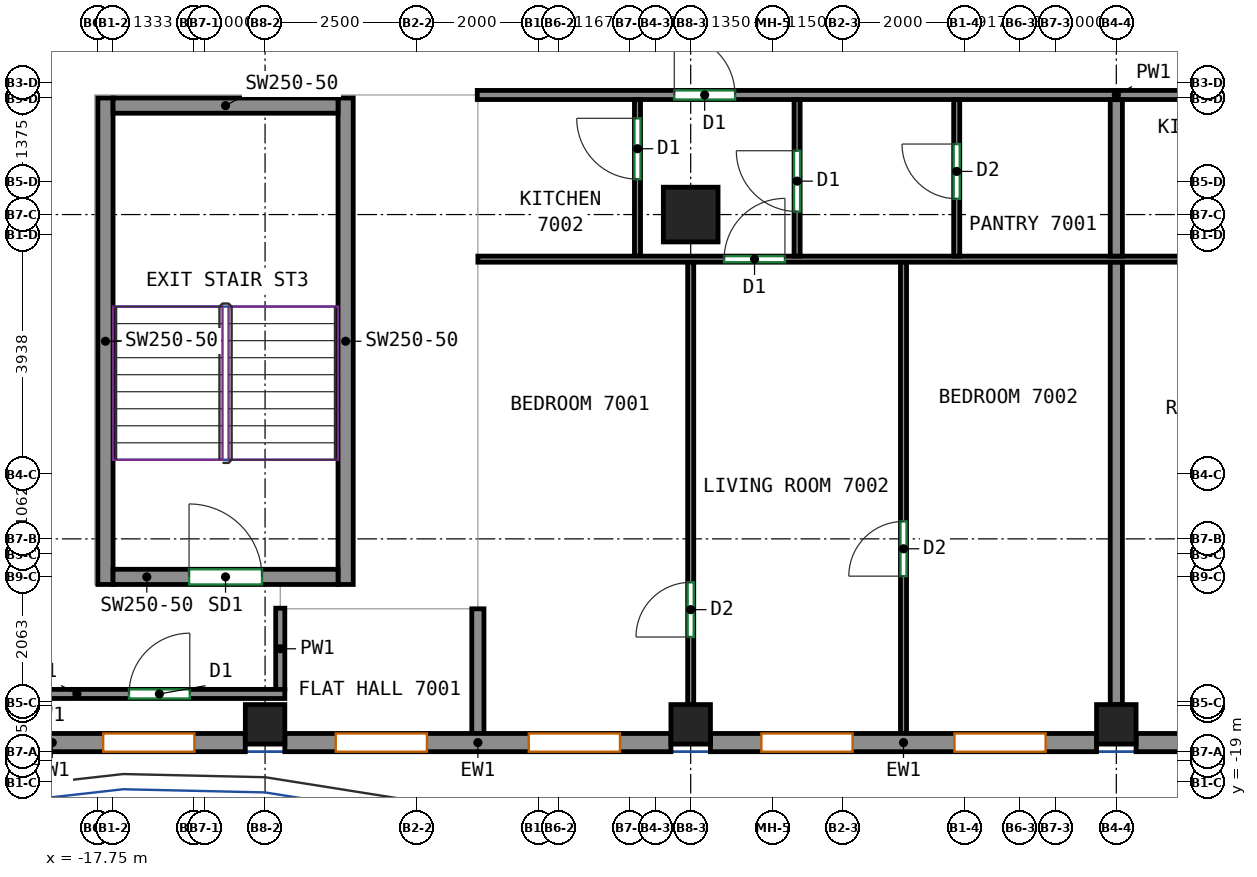
"""IFC4 building model, lengths in metres.
Left out: names, types, materials, properties, quantities, classifications, styles, units other than length and angle.
Written with IfcOpenShell. Run it as: python <this file> out.ifc"""

import sys

from ifc_helpers import new_model, si_unit, direction, frame, frame_2d, origin, origin_2d, place, context, subcontext, project, spatial, rectangle, extrude, source, transform, mapped, element, fill, save


model = new_model("IFC4")
c1 = context("Model", 3, precision=1e-05, world=origin(), true_north=direction((0.0, 1.0)))
c2 = subcontext(c1, "Body", "Model", "MODEL_VIEW")
j1 = project(units=[si_unit("LENGTHUNIT", "METRE"), si_unit("PLANEANGLEUNIT", "RADIAN")], contexts=[c1])
p1 = place(None, origin())
s1 = spatial("IfcSite", under=j1, at=p1, CompositionType="ELEMENT")
p2 = place(p1, origin())
s2 = spatial("IfcBuilding", under=s1, at=p2, CompositionType="ELEMENT")
p3 = place(p2, frame((0.0, 0.0, 284.0)))
s3 = spatial("IfcBuildingStorey", under=s2, at=p3, CompositionType="ELEMENT", Elevation=284.0)
m1 = source(origin(), c2, "Body", "SweptSolid", [
    extrude(rectangle(XDim=0.65, YDim=0.65, at=origin_2d()), origin(), (0.0, 0.0, 1.0), 3.12),
])
for number, where, z_axis, x_axis in (
    (1, (-15.0, -18.05, 0.0), (0.0, 0.0, 1.0), (1.0, 0.0, 0.0)),
    (2, (-8.0, -18.05, 0.0), (0.0, 0.0, 1.0), (1.0, 0.0, 0.0)),
):
    element("IfcColumn", number, at=place(p3, frame(where, z_axis=z_axis, x_axis=x_axis)), inside=s3, PredefinedType="COLUMN", context=c2, shape_type="MappedRepresentation", body=[
        mapped(m1, transform((0.0, 0.0, 0.0))),
    ])
m2 = source(origin(), c2, "Body", "SweptSolid", [
    extrude(rectangle(XDim=0.9, YDim=0.9, at=origin_2d()), origin(), (0.0, 0.0, 1.0), 3.12),
])
p4 = place(p3, frame((-8.0, -9.667, 0.0), z_axis=(0.0, 0.0, 1.0), x_axis=(1.0, 0.0, 0.0)))
e3 = element("IfcColumn", 3, at=p4, inside=s3, PredefinedType="COLUMN", context=c2, shape_type="MappedRepresentation", body=[
    mapped(m2, transform((0.0, 0.0, 0.0))),
])
p5 = place(p3, frame((-1.0, -18.05, 0.0), z_axis=(0.0, 0.0, 1.0), x_axis=(1.0, 0.0, 0.0)))
e4 = element("IfcColumn", 4, at=p5, inside=s3, PredefinedType="COLUMN", context=c2, shape_type="MappedRepresentation", body=[
    mapped(m1, transform((0.0, 0.0, 0.0))),
])
m3 = source(origin(), c2, "Body", "SweptSolid", [
    extrude(rectangle(XDim=8.0, YDim=0.25, at=frame_2d((4.0, 0.0))), origin(), (0.0, 0.0, 1.0), 3.12),
])
for number, where, z_axis, x_axis in (
    (5, (-17.625, -15.75, 0.0), (0.0, 0.0, 1.0), (0.0, 1.0, 0.0)),
    (6, (-13.675, -15.75, 0.0), (0.0, 0.0, 1.0), (0.0, 1.0, 0.0)),
):
    element("IfcWall", number, at=place(p3, frame(where, z_axis=z_axis, x_axis=x_axis)), inside=s3, PredefinedType="SHEAR", context=c2, shape_type="MappedRepresentation", body=[
        mapped(m3, transform((0.0, 0.0, 0.0))),
    ])
m4 = source(origin(), c2, "Body", "SweptSolid", [
    extrude(rectangle(XDim=3.7, YDim=0.25, at=frame_2d((1.85, 0.0))), origin(), (0.0, 0.0, 1.0), 3.12),
])
p6 = place(p3, frame((-17.5, -15.625, 0.0), z_axis=(0.0, 0.0, 1.0), x_axis=(1.0, 0.0, 0.0)))
e7 = element("IfcWall", 7, at=p6, inside=s3, PredefinedType="SHEAR", context=c2, shape_type="MappedRepresentation", body=[
    mapped(m4, transform((0.0, 0.0, 0.0))),
])
p7 = place(p6, frame((1.25, 0.0, 0.0)))
e8 = element("IfcOpeningElement", 8, at=p7, cuts=e7, PredefinedType="OPENING", context=c2, shape_type="SweptSolid", body=[
    extrude(rectangle(XDim=1.2, YDim=2.1, at=frame_2d((0.6, 1.05))), frame((0.0, 0.135, 0.0), z_axis=(0.0, -1.0, 0.0), x_axis=(1.0, 0.0, 0.0)), (0.0, 0.0, 1.0), 0.27),
])
p8 = place(p3, frame((-17.5, -7.875, 0.0), z_axis=(0.0, 0.0, 1.0), x_axis=(1.0, 0.0, 0.0)))
e9 = element("IfcWall", 9, at=p8, inside=s3, PredefinedType="SHEAR", context=c2, shape_type="MappedRepresentation", body=[
    mapped(m4, transform((0.0, 0.0, 0.0))),
])
m5 = source(origin(), c2, "Body", "SweptSolid", [
    extrude(rectangle(XDim=6.35, YDim=0.3, at=frame_2d((3.175, 0.0))), origin(), (0.0, 0.0, 1.0), 3.12),
])
p9 = place(p3, frame((-21.675, -18.35, 0.0), z_axis=(0.0, 0.0, 1.0), x_axis=(1.0, 0.0, 0.0)))
e10 = element("IfcWall", 10, at=p9, inside=s3, PredefinedType="SOLIDWALL", context=c2, shape_type="MappedRepresentation", body=[
    mapped(m5, transform((0.0, 0.0, 0.0))),
])
p10 = place(p9, frame((0.837, 0.0, 0.8)))
e11 = element("IfcOpeningElement", 11, at=p10, cuts=e10, PredefinedType="OPENING", context=c2, shape_type="SweptSolid", body=[
    extrude(rectangle(XDim=1.5, YDim=2.05, at=frame_2d((0.75, 1.025))), frame((0.0, 0.16, 0.0), z_axis=(0.0, -1.0, 0.0), x_axis=(1.0, 0.0, 0.0)), (0.0, 0.0, 1.0), 0.32),
])
p11 = place(p9, frame((4.012, 0.0, 0.8)))
e12 = element("IfcOpeningElement", 12, at=p11, cuts=e10, PredefinedType="OPENING", context=c2, shape_type="SweptSolid", body=[
    extrude(rectangle(XDim=1.5, YDim=2.05, at=frame_2d((0.75, 1.025))), frame((0.0, 0.16, 0.0), z_axis=(0.0, -1.0, 0.0), x_axis=(1.0, 0.0, 0.0)), (0.0, 0.0, 1.0), 0.32),
])
p12 = place(p3, frame((-14.675, -18.35, 0.0), z_axis=(0.0, 0.0, 1.0), x_axis=(1.0, 0.0, 0.0)))
e13 = element("IfcWall", 13, at=p12, inside=s3, PredefinedType="SOLIDWALL", context=c2, shape_type="MappedRepresentation", body=[
    mapped(m5, transform((0.0, 0.0, 0.0))),
])
p13 = place(p12, frame((0.837, 0.0, 0.8)))
e14 = element("IfcOpeningElement", 14, at=p13, cuts=e13, PredefinedType="OPENING", context=c2, shape_type="SweptSolid", body=[
    extrude(rectangle(XDim=1.5, YDim=2.05, at=frame_2d((0.75, 1.025))), frame((0.0, 0.16, 0.0), z_axis=(0.0, -1.0, 0.0), x_axis=(1.0, 0.0, 0.0)), (0.0, 0.0, 1.0), 0.32),
])
p14 = place(p12, frame((4.012, 0.0, 0.8)))
e15 = element("IfcOpeningElement", 15, at=p14, cuts=e13, PredefinedType="OPENING", context=c2, shape_type="SweptSolid", body=[
    extrude(rectangle(XDim=1.5, YDim=2.05, at=frame_2d((0.75, 1.025))), frame((0.0, 0.16, 0.0), z_axis=(0.0, -1.0, 0.0), x_axis=(1.0, 0.0, 0.0)), (0.0, 0.0, 1.0), 0.32),
])
p15 = place(p3, frame((-7.675, -18.35, 0.0), z_axis=(0.0, 0.0, 1.0), x_axis=(1.0, 0.0, 0.0)))
e16 = element("IfcWall", 16, at=p15, inside=s3, PredefinedType="SOLIDWALL", context=c2, shape_type="MappedRepresentation", body=[
    mapped(m5, transform((0.0, 0.0, 0.0))),
])
p16 = place(p15, frame((0.837, 0.0, 0.8)))
e17 = element("IfcOpeningElement", 17, at=p16, cuts=e16, PredefinedType="OPENING", context=c2, shape_type="SweptSolid", body=[
    extrude(rectangle(XDim=1.5, YDim=2.05, at=frame_2d((0.75, 1.025))), frame((0.0, 0.16, 0.0), z_axis=(0.0, -1.0, 0.0), x_axis=(1.0, 0.0, 0.0)), (0.0, 0.0, 1.0), 0.32),
])
p17 = place(p15, frame((4.012, 0.0, 0.8)))
e18 = element("IfcOpeningElement", 18, at=p17, cuts=e16, PredefinedType="OPENING", context=c2, shape_type="SweptSolid", body=[
    extrude(rectangle(XDim=1.5, YDim=2.05, at=frame_2d((0.75, 1.025))), frame((0.0, 0.16, 0.0), z_axis=(0.0, -1.0, 0.0), x_axis=(1.0, 0.0, 0.0)), (0.0, 0.0, 1.0), 0.32),
])
p18 = place(p3, frame((-0.675, -18.35, 0.0), z_axis=(0.0, 0.0, 1.0), x_axis=(1.0, 0.0, 0.0)))
e19 = element("IfcWall", 19, at=p18, inside=s3, PredefinedType="SOLIDWALL", context=c2, shape_type="MappedRepresentation", body=[
    mapped(m5, transform((0.0, 0.0, 0.0))),
])
p19 = place(p18, frame((0.837, 0.0, 0.8)))
e20 = element("IfcOpeningElement", 20, at=p19, cuts=e19, PredefinedType="OPENING", context=c2, shape_type="SweptSolid", body=[
    extrude(rectangle(XDim=1.5, YDim=2.05, at=frame_2d((0.75, 1.025))), frame((0.0, 0.16, 0.0), z_axis=(0.0, -1.0, 0.0), x_axis=(1.0, 0.0, 0.0)), (0.0, 0.0, 1.0), 0.32),
])
p20 = place(p18, frame((4.012, 0.0, 0.8)))
e21 = element("IfcOpeningElement", 21, at=p20, cuts=e19, PredefinedType="OPENING", context=c2, shape_type="SweptSolid", body=[
    extrude(rectangle(XDim=1.5, YDim=2.05, at=frame_2d((0.75, 1.025))), frame((0.0, 0.16, 0.0), z_axis=(0.0, -1.0, 0.0), x_axis=(1.0, 0.0, 0.0)), (0.0, 0.0, 1.0), 0.32),
])
p21 = place(p3, frame((-14.75, -17.475, 0.0), z_axis=(0.0, 0.0, 1.0), x_axis=(0.0, 1.0, 0.0)))
e22 = element("IfcWall", 22, at=p21, inside=s3, PredefinedType="PARTITIONING", context=c2, shape_type="SweptSolid", body=[
    extrude(rectangle(XDim=1.335, YDim=0.15, at=frame_2d((0.667, 0.0))), origin(), (0.0, 0.0, 1.0), 3.12),
])
p22 = place(p3, frame((-18.698, -17.55, 0.0), z_axis=(0.0, 0.0, 1.0), x_axis=(1.0, 0.0, 0.0)))
e23 = element("IfcWall", 23, at=p22, inside=s3, PredefinedType="PARTITIONING", context=c2, shape_type="SweptSolid", body=[
    extrude(rectangle(XDim=4.023, YDim=0.15, at=frame_2d((2.011, 0.0))), origin(), (0.0, 0.0, 1.0), 3.12),
])
p23 = place(p22, frame((1.46, 0.0, 0.0)))
e24 = element("IfcOpeningElement", 24, at=p23, cuts=e23, PredefinedType="OPENING", context=c2, shape_type="SweptSolid", body=[
    extrude(rectangle(XDim=1.0, YDim=2.1, at=frame_2d((0.5, 1.05))), frame((0.0, 0.085, 0.0), z_axis=(0.0, -1.0, 0.0), x_axis=(1.0, 0.0, 0.0)), (0.0, 0.0, 1.0), 0.17),
])
p24 = place(p3, frame((-11.51, -7.7, 0.0), z_axis=(0.0, 0.0, 1.0), x_axis=(1.0, 0.0, 0.0)))
e25 = element("IfcWall", 25, at=p24, inside=s3, PredefinedType="PARTITIONING", context=c2, shape_type="SweptSolid", body=[
    extrude(rectangle(XDim=21.02, YDim=0.15, at=frame_2d((10.51, 0.0))), origin(), (0.0, 0.0, 1.0), 3.12),
])
p25 = place(p24, frame((3.24, 0.0, 0.0)))
e26 = element("IfcOpeningElement", 26, at=p25, cuts=e25, PredefinedType="OPENING", context=c2, shape_type="SweptSolid", body=[
    extrude(rectangle(XDim=1.0, YDim=2.1, at=frame_2d((0.5, 1.05))), frame((0.0, 0.085, 0.0), z_axis=(0.0, -1.0, 0.0), x_axis=(1.0, 0.0, 0.0)), (0.0, 0.0, 1.0), 0.17),
])
p26 = place(p24, frame((14.321, 0.0, 0.0)))
e27 = element("IfcOpeningElement", 27, at=p26, cuts=e25, PredefinedType="OPENING", context=c2, shape_type="SweptSolid", body=[
    extrude(rectangle(XDim=1.0, YDim=2.1, at=frame_2d((0.5, 1.05))), frame((0.0, 0.085, 0.0), z_axis=(0.0, -1.0, 0.0), x_axis=(1.0, 0.0, 0.0)), (0.0, 0.0, 1.0), 0.17),
])
p27 = place(p3, frame((-11.5, -18.25, 0.0), z_axis=(0.0, 0.0, 1.0), x_axis=(0.0, 1.0, 0.0)))
e28 = element("IfcWall", 28, at=p27, inside=s3, PredefinedType="PARTITIONING", context=c2, shape_type="SweptSolid", body=[
    extrude(rectangle(XDim=2.1, YDim=0.2, at=frame_2d((1.05, 0.0))), origin(), (0.0, 0.0, 1.0), 3.12),
])
p28 = place(p3, frame((-8.875, -10.35, 0.0), z_axis=(0.0, 0.0, 1.0), x_axis=(0.0, 1.0, 0.0)))
e29 = element("IfcWall", 29, at=p28, inside=s3, PredefinedType="PARTITIONING", context=c2, shape_type="SweptSolid", body=[
    extrude(rectangle(XDim=2.573, YDim=0.1, at=frame_2d((1.287, 0.0))), origin(), (0.0, 0.0, 1.0), 3.12),
])
p29 = place(p28, frame((1.266, 0.0, 0.0)))
e30 = element("IfcOpeningElement", 30, at=p29, cuts=e29, PredefinedType="OPENING", context=c2, shape_type="SweptSolid", body=[
    extrude(rectangle(XDim=1.0, YDim=2.1, at=frame_2d((0.5, 1.05))), frame((0.0, 0.06, 0.0), z_axis=(0.0, -1.0, 0.0), x_axis=(1.0, 0.0, 0.0)), (0.0, 0.0, 1.0), 0.12),
])
p30 = place(p3, frame((-11.5, -10.4, 0.0), z_axis=(0.0, 0.0, 1.0), x_axis=(1.0, 0.0, 0.0)))
e31 = element("IfcWall", 31, at=p30, inside=s3, PredefinedType="PARTITIONING", context=c2, shape_type="SweptSolid", body=[
    extrude(rectangle(XDim=21.1, YDim=0.1, at=frame_2d((10.55, 0.0))), origin(), (0.0, 0.0, 1.0), 3.12),
])
p31 = place(p30, frame((4.05, 0.0, 0.0)))
e32 = element("IfcOpeningElement", 32, at=p31, cuts=e31, PredefinedType="OPENING", context=c2, shape_type="SweptSolid", body=[
    extrude(rectangle(XDim=1.0, YDim=2.1, at=frame_2d((0.5, 1.05))), frame((0.0, 0.06, 0.0), z_axis=(0.0, -1.0, 0.0), x_axis=(1.0, 0.0, 0.0)), (0.0, 0.0, 1.0), 0.12),
])
p32 = place(p30, frame((11.727, 0.0, 0.0)))
e33 = element("IfcOpeningElement", 33, at=p32, cuts=e31, PredefinedType="OPENING", context=c2, shape_type="SweptSolid", body=[
    extrude(rectangle(XDim=0.9, YDim=2.1, at=frame_2d((0.45, 1.05))), frame((0.0, 0.06, 0.0), z_axis=(0.0, -1.0, 0.0), x_axis=(1.0, 0.0, 0.0)), (0.0, 0.0, 1.0), 0.12),
])
p33 = place(p30, frame((15.225, 0.0, 0.0)))
e34 = element("IfcOpeningElement", 34, at=p33, cuts=e31, PredefinedType="OPENING", context=c2, shape_type="SweptSolid", body=[
    extrude(rectangle(XDim=1.0, YDim=2.1, at=frame_2d((0.5, 1.05))), frame((0.0, 0.06, 0.0), z_axis=(0.0, -1.0, 0.0), x_axis=(1.0, 0.0, 0.0)), (0.0, 0.0, 1.0), 0.12),
])
p34 = place(p3, frame((-6.25, -10.35, 0.0), z_axis=(0.0, 0.0, 1.0), x_axis=(0.0, 1.0, 0.0)))
e35 = element("IfcWall", 35, at=p34, inside=s3, PredefinedType="PARTITIONING", context=c2, shape_type="SweptSolid", body=[
    extrude(rectangle(XDim=2.573, YDim=0.1, at=frame_2d((1.287, 0.0))), origin(), (0.0, 0.0, 1.0), 3.12),
])
p35 = place(p34, frame((0.733, 0.0, 0.0)))
e36 = element("IfcOpeningElement", 36, at=p35, cuts=e35, PredefinedType="OPENING", context=c2, shape_type="SweptSolid", body=[
    extrude(rectangle(XDim=1.0, YDim=2.1, at=frame_2d((0.5, 1.05))), frame((0.0, 0.06, 0.0), z_axis=(0.0, -1.0, 0.0), x_axis=(1.0, 0.0, 0.0)), (0.0, 0.0, 1.0), 0.12),
])
p36 = place(p3, frame((-3.625, -10.35, 0.0), z_axis=(0.0, 0.0, 1.0), x_axis=(0.0, 1.0, 0.0)))
e37 = element("IfcWall", 37, at=p36, inside=s3, PredefinedType="PARTITIONING", context=c2, shape_type="SweptSolid", body=[
    extrude(rectangle(XDim=2.573, YDim=0.1, at=frame_2d((1.287, 0.0))), origin(), (0.0, 0.0, 1.0), 3.12),
])
p37 = place(p36, frame((0.943, 0.0, 0.0)))
e38 = element("IfcOpeningElement", 38, at=p37, cuts=e37, PredefinedType="OPENING", context=c2, shape_type="SweptSolid", body=[
    extrude(rectangle(XDim=0.9, YDim=2.1, at=frame_2d((0.45, 1.05))), frame((0.0, 0.06, 0.0), z_axis=(0.0, -1.0, 0.0), x_axis=(1.0, 0.0, 0.0)), (0.0, 0.0, 1.0), 0.12),
])
p38 = place(p3, frame((-1.0, -10.35, 0.0), z_axis=(0.0, 0.0, 1.0), x_axis=(0.0, 1.0, 0.0)))
e39 = element("IfcWall", 39, at=p38, inside=s3, PredefinedType="PARTITIONING", context=c2, shape_type="SweptSolid", body=[
    extrude(rectangle(XDim=2.573, YDim=0.2, at=frame_2d((1.287, 0.0))), origin(), (0.0, 0.0, 1.0), 3.12),
])
p39 = place(p3, frame((-8.0, -17.725, 0.0), z_axis=(0.0, 0.0, 1.0), x_axis=(0.0, 1.0, 0.0)))
e40 = element("IfcWall", 40, at=p39, inside=s3, PredefinedType="PARTITIONING", context=c2, shape_type="SweptSolid", body=[
    extrude(rectangle(XDim=7.273, YDim=0.1, at=frame_2d((3.637, 0.0))), origin(), (0.0, 0.0, 1.0), 3.12),
])
p40 = place(p39, frame((1.111, 0.0, 0.0)))
e41 = element("IfcOpeningElement", 41, at=p40, cuts=e40, PredefinedType="OPENING", context=c2, shape_type="SweptSolid", body=[
    extrude(rectangle(XDim=0.9, YDim=2.1, at=frame_2d((0.45, 1.05))), frame((0.0, 0.06, 0.0), z_axis=(0.0, -1.0, 0.0), x_axis=(1.0, 0.0, 0.0)), (0.0, 0.0, 1.0), 0.12),
])
p41 = place(p3, frame((-4.5, -18.25, 0.0), z_axis=(0.0, 0.0, 1.0), x_axis=(0.0, 1.0, 0.0)))
e42 = element("IfcWall", 42, at=p41, inside=s3, PredefinedType="PARTITIONING", context=c2, shape_type="SweptSolid", body=[
    extrude(rectangle(XDim=7.798, YDim=0.1, at=frame_2d((3.899, 0.0))), origin(), (0.0, 0.0, 1.0), 3.12),
])
p42 = place(p41, frame((2.637, 0.0, 0.0)))
e43 = element("IfcOpeningElement", 43, at=p42, cuts=e42, PredefinedType="OPENING", context=c2, shape_type="SweptSolid", body=[
    extrude(rectangle(XDim=0.9, YDim=2.1, at=frame_2d((0.45, 1.05))), frame((0.0, 0.06, 0.0), z_axis=(0.0, -1.0, 0.0), x_axis=(1.0, 0.0, 0.0)), (0.0, 0.0, 1.0), 0.12),
])
p43 = place(p3, frame((-1.0, -17.725, 0.0), z_axis=(0.0, 0.0, 1.0), x_axis=(0.0, 1.0, 0.0)))
e44 = element("IfcWall", 44, at=p43, inside=s3, PredefinedType="PARTITIONING", context=c2, shape_type="SweptSolid", body=[
    extrude(rectangle(XDim=7.273, YDim=0.2, at=frame_2d((3.637, 0.0))), origin(), (0.0, 0.0, 1.0), 3.12),
])
p44 = place(p11, origin())
e45 = element("IfcWindow", 45, at=p44, inside=s3, PartitioningType="SINGLE_PANEL", PredefinedType="WINDOW", context=c2, shape_type="SweptSolid", body=[
    extrude(rectangle(XDim=1.5, YDim=2.05, at=frame_2d((0.75, 1.025))), frame((0.0, 0.03, 0.0), z_axis=(0.0, -1.0, 0.0), x_axis=(1.0, 0.0, 0.0)), (0.0, 0.0, 1.0), 0.06),
])
fill(e12, e45)
p45 = place(p13, origin())
e46 = element("IfcWindow", 46, at=p45, inside=s3, PartitioningType="SINGLE_PANEL", PredefinedType="WINDOW", context=c2, shape_type="SweptSolid", body=[
    extrude(rectangle(XDim=1.5, YDim=2.05, at=frame_2d((0.75, 1.025))), frame((0.0, 0.03, 0.0), z_axis=(0.0, -1.0, 0.0), x_axis=(1.0, 0.0, 0.0)), (0.0, 0.0, 1.0), 0.06),
])
fill(e14, e46)
p46 = place(p14, origin())
e47 = element("IfcWindow", 47, at=p46, inside=s3, PartitioningType="SINGLE_PANEL", PredefinedType="WINDOW", context=c2, shape_type="SweptSolid", body=[
    extrude(rectangle(XDim=1.5, YDim=2.05, at=frame_2d((0.75, 1.025))), frame((0.0, 0.03, 0.0), z_axis=(0.0, -1.0, 0.0), x_axis=(1.0, 0.0, 0.0)), (0.0, 0.0, 1.0), 0.06),
])
fill(e15, e47)
p47 = place(p16, origin())
e48 = element("IfcWindow", 48, at=p47, inside=s3, PartitioningType="SINGLE_PANEL", PredefinedType="WINDOW", context=c2, shape_type="SweptSolid", body=[
    extrude(rectangle(XDim=1.5, YDim=2.05, at=frame_2d((0.75, 1.025))), frame((0.0, 0.03, 0.0), z_axis=(0.0, -1.0, 0.0), x_axis=(1.0, 0.0, 0.0)), (0.0, 0.0, 1.0), 0.06),
])
fill(e17, e48)
p48 = place(p17, origin())
e49 = element("IfcWindow", 49, at=p48, inside=s3, PartitioningType="SINGLE_PANEL", PredefinedType="WINDOW", context=c2, shape_type="SweptSolid", body=[
    extrude(rectangle(XDim=1.5, YDim=2.05, at=frame_2d((0.75, 1.025))), frame((0.0, 0.03, 0.0), z_axis=(0.0, -1.0, 0.0), x_axis=(1.0, 0.0, 0.0)), (0.0, 0.0, 1.0), 0.06),
])
fill(e18, e49)
p49 = place(p7, origin())
e50 = element("IfcDoor", 50, at=p49, inside=s3, OperationType="DOUBLE_DOOR_SINGLE_SWING", PredefinedType="DOOR", context=c2, shape_type="SweptSolid", body=[
    extrude(rectangle(XDim=1.2, YDim=2.1, at=frame_2d((0.6, 1.05))), frame((0.0, 0.025, 0.0), z_axis=(0.0, -1.0, 0.0), x_axis=(1.0, 0.0, 0.0)), (0.0, 0.0, 1.0), 0.05),
])
fill(e8, e50)
p50 = place(p23, origin())
e51 = element("IfcDoor", 51, at=p50, inside=s3, OperationType="SINGLE_SWING_RIGHT", PredefinedType="DOOR", context=c2, shape_type="SweptSolid", body=[
    extrude(rectangle(XDim=1.0, YDim=2.1, at=frame_2d((0.5, 1.05))), frame((0.0, 0.025, 0.0), z_axis=(0.0, -1.0, 0.0), x_axis=(1.0, 0.0, 0.0)), (0.0, 0.0, 1.0), 0.05),
])
fill(e24, e51)
p51 = place(p40, origin())
e52 = element("IfcDoor", 52, at=p51, inside=s3, OperationType="SINGLE_SWING_LEFT", PredefinedType="DOOR", context=c2, shape_type="SweptSolid", body=[
    extrude(rectangle(XDim=0.9, YDim=2.1, at=frame_2d((0.45, 1.05))), frame((0.0, 0.025, 0.0), z_axis=(0.0, -1.0, 0.0), x_axis=(1.0, 0.0, 0.0)), (0.0, 0.0, 1.0), 0.05),
])
fill(e41, e52)
p52 = place(p42, origin())
e53 = element("IfcDoor", 53, at=p52, inside=s3, OperationType="SINGLE_SWING_LEFT", PredefinedType="DOOR", context=c2, shape_type="SweptSolid", body=[
    extrude(rectangle(XDim=0.9, YDim=2.1, at=frame_2d((0.45, 1.05))), frame((0.0, 0.025, 0.0), z_axis=(0.0, -1.0, 0.0), x_axis=(1.0, 0.0, 0.0)), (0.0, 0.0, 1.0), 0.05),
])
fill(e43, e53)
p53 = place(p31, origin())
e54 = element("IfcDoor", 54, at=p53, inside=s3, OperationType="SINGLE_SWING_RIGHT", PredefinedType="DOOR", context=c2, shape_type="SweptSolid", body=[
    extrude(rectangle(XDim=1.0, YDim=2.1, at=frame_2d((0.5, 1.05))), frame((0.0, 0.025, 0.0), z_axis=(0.0, -1.0, 0.0), x_axis=(1.0, 0.0, 0.0)), (0.0, 0.0, 1.0), 0.05),
])
fill(e32, e54)
p54 = place(p35, origin())
e55 = element("IfcDoor", 55, at=p54, inside=s3, OperationType="SINGLE_SWING_RIGHT", PredefinedType="DOOR", context=c2, shape_type="SweptSolid", body=[
    extrude(rectangle(XDim=1.0, YDim=2.1, at=frame_2d((0.5, 1.05))), frame((0.0, 0.025, 0.0), z_axis=(0.0, -1.0, 0.0), x_axis=(1.0, 0.0, 0.0)), (0.0, 0.0, 1.0), 0.05),
])
fill(e36, e55)
p55 = place(p37, origin())
e56 = element("IfcDoor", 56, at=p55, inside=s3, OperationType="SINGLE_SWING_RIGHT", PredefinedType="DOOR", context=c2, shape_type="SweptSolid", body=[
    extrude(rectangle(XDim=0.9, YDim=2.1, at=frame_2d((0.45, 1.05))), frame((0.0, 0.025, 0.0), z_axis=(0.0, -1.0, 0.0), x_axis=(1.0, 0.0, 0.0)), (0.0, 0.0, 1.0), 0.05),
])
fill(e38, e56)
p56 = place(p29, origin())
e57 = element("IfcDoor", 57, at=p56, inside=s3, OperationType="SINGLE_SWING_RIGHT", PredefinedType="DOOR", context=c2, shape_type="SweptSolid", body=[
    extrude(rectangle(XDim=1.0, YDim=2.1, at=frame_2d((0.5, 1.05))), frame((0.0, 0.025, 0.0), z_axis=(0.0, -1.0, 0.0), x_axis=(1.0, 0.0, 0.0)), (0.0, 0.0, 1.0), 0.05),
])
fill(e30, e57)
p57 = place(p25, origin())
e58 = element("IfcDoor", 58, at=p57, inside=s3, OperationType="SINGLE_SWING_LEFT", PredefinedType="DOOR", context=c2, shape_type="SweptSolid", body=[
    extrude(rectangle(XDim=1.0, YDim=2.1, at=frame_2d((0.5, 1.05))), frame((0.0, 0.025, 0.0), z_axis=(0.0, -1.0, 0.0), x_axis=(1.0, 0.0, 0.0)), (0.0, 0.0, 1.0), 0.05),
])
fill(e26, e58)
save(model, sys.argv[1])
